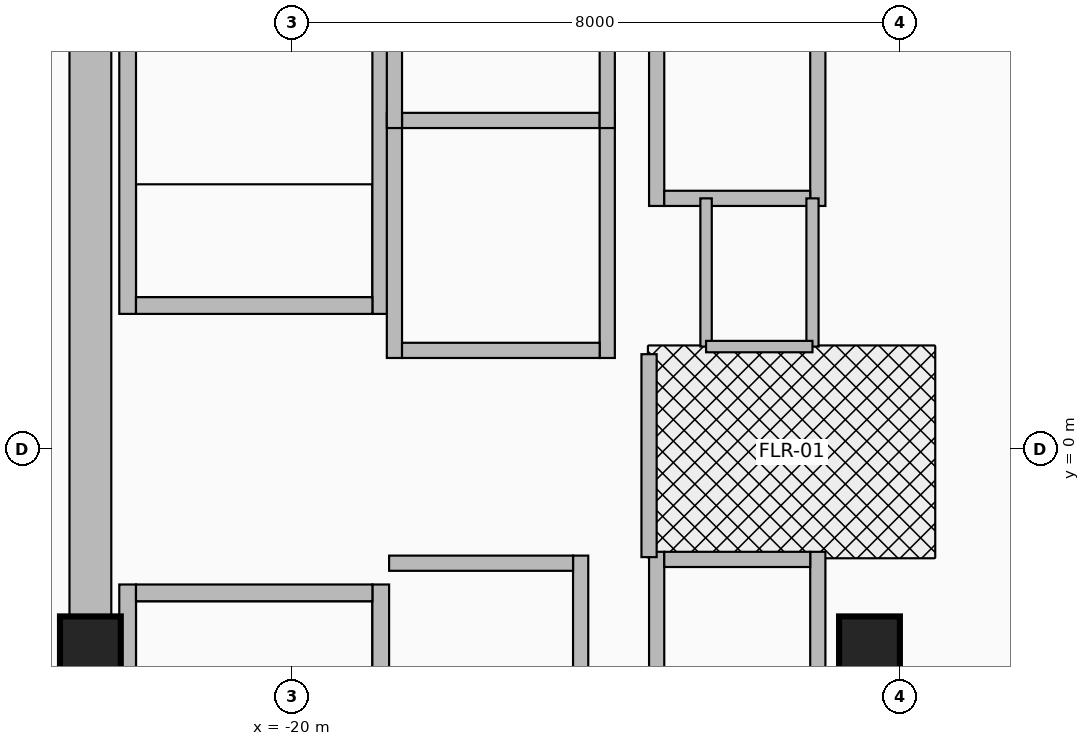
"""IFC4 building model, lengths in metres.
Left out: names, types, materials, properties, quantities, classifications, styles, units other than length and angle.
Written with IfcOpenShell. Run it as: python <this file> out.ifc"""

import sys

from ifc_helpers import new_model, si_unit, direction, frame, frame_2d, origin, origin_2d, place, context, subcontext, project, spatial, rectangle, extrude, source, transform, mapped, element, fill, save


model = new_model("IFC4")
c1 = context("Model", 3, precision=1e-05, world=origin(), true_north=direction((0.0, 1.0)))
c2 = subcontext(c1, "Body", "Model", "MODEL_VIEW")
j1 = project(units=[si_unit("LENGTHUNIT", "METRE"), si_unit("PLANEANGLEUNIT", "RADIAN")], contexts=[c1])
p1 = place(None, origin())
s1 = spatial("IfcSite", under=j1, at=p1, CompositionType="ELEMENT")
p2 = place(p1, origin())
s2 = spatial("IfcBuilding", under=s1, at=p2, CompositionType="ELEMENT")
p3 = place(p2, frame((0.0, 0.0, 240.5)))
s3 = spatial("IfcBuildingStorey", under=s2, at=p3, CompositionType="ELEMENT", Elevation=240.5)
for number, where, z_axis, x_axis in (
    (1, (-22.16, 1.78, 0.0), (0.0, 0.0, 1.0), (0.0, 1.0, 0.0)),
    (2, (-18.83, 1.78, 0.0), (0.0, 0.0, 1.0), (0.0, 1.0, 0.0)),
):
    element("IfcWall", number, at=place(p3, frame(where, z_axis=z_axis, x_axis=x_axis)), inside=s3, PredefinedType="SHEAR", context=c2, shape_type="SweptSolid", body=[
        extrude(rectangle(XDim=8.745, YDim=0.22, at=frame_2d((4.373, 0.0))), origin(), (0.0, 0.0, 1.0), 3.26),
    ])
p4 = place(p3, frame((-22.05, 1.89, 0.0), z_axis=(0.0, 0.0, 1.0), x_axis=(1.0, 0.0, 0.0)))
e3 = element("IfcWall", 3, at=p4, inside=s3, PredefinedType="SHEAR", context=c2, shape_type="SweptSolid", body=[
    extrude(rectangle(XDim=3.11, YDim=0.22, at=frame_2d((1.555, 0.0))), origin(), (0.0, 0.0, 1.0), 3.26),
])
p5 = place(p4, frame((1.0, 0.0, 0.0)))
e4 = element("IfcOpeningElement", 4, at=p5, cuts=e3, PredefinedType="OPENING", context=c2, shape_type="SweptSolid", body=[
    extrude(rectangle(XDim=1.1, YDim=2.15, at=frame_2d((0.55, 1.075))), frame((0.0, 0.125, 0.0), z_axis=(0.0, -1.0, 0.0), x_axis=(1.0, 0.0, 0.0)), (0.0, 0.0, 1.0), 0.25),
])
for number, where, z_axis, x_axis in (
    (5, (-22.16, -10.525, 0.0), (0.0, 0.0, 1.0), (0.0, 1.0, 0.0)),
    (6, (-18.83, -10.525, 0.0), (0.0, 0.0, 1.0), (0.0, 1.0, 0.0)),
):
    element("IfcWall", number, at=place(p3, frame(where, z_axis=z_axis, x_axis=x_axis)), inside=s3, PredefinedType="SHEAR", context=c2, shape_type="SweptSolid", body=[
        extrude(rectangle(XDim=8.745, YDim=0.22, at=frame_2d((4.373, 0.0))), origin(), (0.0, 0.0, 1.0), 3.26),
    ])
p6 = place(p3, frame((-22.05, -1.89, 0.0), z_axis=(0.0, 0.0, 1.0), x_axis=(1.0, 0.0, 0.0)))
e7 = element("IfcWall", 7, at=p6, inside=s3, PredefinedType="SHEAR", context=c2, shape_type="SweptSolid", body=[
    extrude(rectangle(XDim=3.11, YDim=0.22, at=frame_2d((1.555, 0.0))), origin(), (0.0, 0.0, 1.0), 3.26),
])
p7 = place(p6, frame((1.0, 0.0, 0.0)))
e8 = element("IfcOpeningElement", 8, at=p7, cuts=e7, PredefinedType="OPENING", context=c2, shape_type="SweptSolid", body=[
    extrude(rectangle(XDim=1.1, YDim=2.15, at=frame_2d((0.55, 1.075))), frame((0.0, 0.125, 0.0), z_axis=(0.0, -1.0, 0.0), x_axis=(1.0, 0.0, 0.0)), (0.0, 0.0, 1.0), 0.25),
])
p8 = place(p3, frame((-22.65, -11.075, 0.0), z_axis=(0.0, 0.0, 1.0), x_axis=(0.0, 1.0, 0.0)))
e9 = element("IfcWall", 9, at=p8, inside=s3, PredefinedType="SHEAR", context=c2, shape_type="SweptSolid", body=[
    extrude(rectangle(XDim=22.15, YDim=0.55, at=frame_2d((11.075, 0.0))), origin(), (0.0, 0.0, 1.0), 3.26),
])
m1 = source(origin(), c2, "Body", "SweptSolid", [
    extrude(rectangle(XDim=0.8, YDim=0.8, at=origin_2d()), origin(), (0.0, 0.0, 1.0), 3.5),
])
for number, where, z_axis, x_axis in (
    (10, (-22.65, -2.6, 0.0), (0.0, 0.0, 1.0), (1.0, 0.0, 0.0)),
    (11, (-12.4, -2.6, 0.0), (0.0, 0.0, 1.0), (1.0, 0.0, 0.0)),
):
    element("IfcColumn", number, at=place(p3, frame(where, z_axis=z_axis, x_axis=x_axis)), inside=s3, PredefinedType="COLUMN", context=c2, shape_type="MappedRepresentation", body=[
        mapped(m1, transform((0.0, 0.0, 0.0), x_axis=(1.0, 0.0, 0.0), y_axis=(0.0, 1.0, 0.0), z_axis=(0.0, 0.0, 1.0), scale=1.0)),
    ])
for number, where, z_axis, x_axis in (
    (12, (-18.65, 1.2, 0.0), (0.0, 0.0, 1.0), (0.0, 1.0, 0.0)),
    (13, (-15.85, 1.2, 0.0), (0.0, 0.0, 1.0), (0.0, 1.0, 0.0)),
):
    element("IfcWall", number, at=place(p3, frame(where, z_axis=z_axis, x_axis=x_axis)), inside=s3, PredefinedType="MOVABLE", context=c2, shape_type="SweptSolid", body=[
        extrude(rectangle(XDim=3.225, YDim=0.2, at=frame_2d((1.613, 0.0))), origin(), (0.0, 0.0, 1.0), 3.26),
    ])
p9 = place(p3, frame((-18.55, 1.3, 0.0), z_axis=(0.0, 0.0, 1.0), x_axis=(1.0, 0.0, 0.0)))
e14 = element("IfcWall", 14, at=p9, inside=s3, PredefinedType="MOVABLE", context=c2, shape_type="SweptSolid", body=[
    extrude(rectangle(XDim=2.6, YDim=0.2, at=frame_2d((1.3, 0.0))), origin(), (0.0, 0.0, 1.0), 3.26),
])
p10 = place(p9, frame((0.7, 0.0, 0.0)))
e15 = element("IfcOpeningElement", 15, at=p10, cuts=e14, PredefinedType="OPENING", context=c2, shape_type="SweptSolid", body=[
    extrude(rectangle(XDim=1.2, YDim=2.1, at=frame_2d((0.6, 1.05))), frame((0.0, 0.115, 0.0), z_axis=(0.0, -1.0, 0.0), x_axis=(1.0, 0.0, 0.0)), (0.0, 0.0, 1.0), 0.23),
])
p11 = place(p3, frame((-18.55, 4.325, 0.0), z_axis=(0.0, 0.0, 1.0), x_axis=(1.0, 0.0, 0.0)))
e16 = element("IfcWall", 16, at=p11, inside=s3, PredefinedType="MOVABLE", context=c2, shape_type="SweptSolid", body=[
    extrude(rectangle(XDim=2.6, YDim=0.2, at=frame_2d((1.3, 0.0))), origin(), (0.0, 0.0, 1.0), 3.26),
])
p12 = place(p3, frame((-16.2, -4.6, 0.0), z_axis=(0.0, 0.0, 1.0), x_axis=(0.0, 1.0, 0.0)))
e17 = element("IfcWall", 17, at=p12, inside=s3, PredefinedType="MOVABLE", context=c2, shape_type="SweptSolid", body=[
    extrude(rectangle(XDim=3.2, YDim=0.2, at=frame_2d((1.6, 0.0))), origin(), (0.0, 0.0, 1.0), 3.26),
])
p13 = place(p3, frame((-18.72, -1.5, 0.0), z_axis=(0.0, 0.0, 1.0), x_axis=(1.0, 0.0, 0.0)))
e18 = element("IfcWall", 18, at=p13, inside=s3, PredefinedType="MOVABLE", context=c2, shape_type="SweptSolid", body=[
    extrude(rectangle(XDim=2.42, YDim=0.2, at=frame_2d((1.21, 0.0))), origin(), (0.0, 0.0, 1.0), 3.26),
])
p14 = place(p13, frame((0.61, 0.0, 0.0)))
e19 = element("IfcOpeningElement", 19, at=p14, cuts=e18, PredefinedType="OPENING", context=c2, shape_type="SweptSolid", body=[
    extrude(rectangle(XDim=1.2, YDim=2.1, at=frame_2d((0.6, 1.05))), frame((0.0, 0.115, 0.0), z_axis=(0.0, -1.0, 0.0), x_axis=(1.0, 0.0, 0.0)), (0.0, 0.0, 1.0), 0.23),
])
for number, where, z_axis, x_axis in (
    (20, (-18.65, 4.225, 0.0), (0.0, 0.0, 1.0), (0.0, 1.0, 0.0)),
    (21, (-15.85, 4.225, 0.0), (0.0, 0.0, 1.0), (0.0, 1.0, 0.0)),
):
    element("IfcWall", number, at=place(p3, frame(where, z_axis=z_axis, x_axis=x_axis)), inside=s3, PredefinedType="MOVABLE", context=c2, shape_type="SweptSolid", body=[
        extrude(rectangle(XDim=3.325, YDim=0.2, at=frame_2d((1.663, 0.0))), origin(), (0.0, 0.0, 1.0), 3.26),
    ])
p15 = place(p3, frame((-15.2, 3.2, 0.0), z_axis=(0.0, 0.0, 1.0), x_axis=(0.0, 1.0, 0.0)))
e22 = element("IfcWall", 22, at=p15, inside=s3, PredefinedType="MOVABLE", context=c2, shape_type="SweptSolid", body=[
    extrude(rectangle(XDim=2.25, YDim=0.2, at=frame_2d((1.125, 0.0))), origin(), (0.0, 0.0, 1.0), 3.26),
])
p16 = place(p3, frame((-13.08, 3.2, 0.0), z_axis=(0.0, 0.0, 1.0), x_axis=(0.0, 1.0, 0.0)))
e23 = element("IfcWall", 23, at=p16, inside=s3, PredefinedType="MOVABLE", context=c2, shape_type="SweptSolid", body=[
    extrude(rectangle(XDim=2.25, YDim=0.2, at=frame_2d((1.125, 0.0))), origin(), (0.0, 0.0, 1.0), 3.26),
])
p17 = place(p16, frame((0.575, 0.0, 0.0)))
e24 = element("IfcOpeningElement", 24, at=p17, cuts=e23, PredefinedType="OPENING", context=c2, shape_type="SweptSolid", body=[
    extrude(rectangle(XDim=1.1, YDim=2.1, at=frame_2d((0.55, 1.05))), frame((0.0, 0.115, 0.0), z_axis=(0.0, -1.0, 0.0), x_axis=(1.0, 0.0, 0.0)), (0.0, 0.0, 1.0), 0.23),
])
p18 = place(p3, frame((-15.1, 3.3, 0.0), z_axis=(0.0, 0.0, 1.0), x_axis=(1.0, 0.0, 0.0)))
e25 = element("IfcWall", 25, at=p18, inside=s3, PredefinedType="MOVABLE", context=c2, shape_type="SweptSolid", body=[
    extrude(rectangle(XDim=1.92, YDim=0.2, at=frame_2d((0.96, 0.0))), origin(), (0.0, 0.0, 1.0), 3.26),
])
for number, where, z_axis, x_axis in (
    (26, (-15.2, -3.7, 0.0), (0.0, 0.0, 1.0), (0.0, 1.0, 0.0)),
    (27, (-13.08, -3.7, 0.0), (0.0, 0.0, 1.0), (0.0, 1.0, 0.0)),
):
    element("IfcWall", number, at=place(p3, frame(where, z_axis=z_axis, x_axis=x_axis)), inside=s3, PredefinedType="MOVABLE", context=c2, shape_type="SweptSolid", body=[
        extrude(rectangle(XDim=2.35, YDim=0.2, at=frame_2d((1.175, 0.0))), origin(), (0.0, 0.0, 1.0), 3.26),
    ])
p19 = place(p3, frame((-15.1, -1.45, 0.0), z_axis=(0.0, 0.0, 1.0), x_axis=(1.0, 0.0, 0.0)))
e28 = element("IfcWall", 28, at=p19, inside=s3, PredefinedType="MOVABLE", context=c2, shape_type="SweptSolid", body=[
    extrude(rectangle(XDim=1.92, YDim=0.2, at=frame_2d((0.96, 0.0))), origin(), (0.0, 0.0, 1.0), 3.26),
])
p20 = place(p19, frame((0.41, 0.0, 0.0)))
e29 = element("IfcOpeningElement", 29, at=p20, cuts=e28, PredefinedType="OPENING", context=c2, shape_type="SweptSolid", body=[
    extrude(rectangle(XDim=1.1, YDim=2.1, at=frame_2d((0.55, 1.05))), frame((0.0, 0.115, 0.0), z_axis=(0.0, -1.0, 0.0), x_axis=(1.0, 0.0, 0.0)), (0.0, 0.0, 1.0), 0.23),
])
p21 = place(p3, frame((-15.3, -1.42, 0.0), z_axis=(0.0, 0.0, 1.0), x_axis=(0.0, 1.0, 0.0)))
e30 = element("IfcWall", 30, at=p21, inside=s3, PredefinedType="PARTITIONING", context=c2, shape_type="SweptSolid", body=[
    extrude(rectangle(XDim=2.67, YDim=0.2, at=frame_2d((1.335, 0.0))), origin(), (0.0, 0.0, 1.0), 3.26),
])
p22 = place(p21, frame((0.78, 0.0, 0.0)))
e31 = element("IfcOpeningElement", 31, at=p22, cuts=e30, PredefinedType="OPENING", context=c2, shape_type="SweptSolid", body=[
    extrude(rectangle(XDim=1.05, YDim=2.15, at=frame_2d((0.525, 1.075))), frame((0.0, 0.115, 0.0), z_axis=(0.0, -1.0, 0.0), x_axis=(1.0, 0.0, 0.0)), (0.0, 0.0, 1.0), 0.23),
])
p23 = place(p3, frame((-13.15, 1.35, 0.0), z_axis=(0.0, 0.0, 1.0), x_axis=(0.0, 1.0, 0.0)))
e32 = element("IfcWall", 32, at=p23, inside=s3, PredefinedType="PARTITIONING", context=c2, shape_type="SweptSolid", body=[
    extrude(rectangle(XDim=1.95, YDim=0.16, at=frame_2d((0.975, 0.0))), origin(), (0.0, 0.0, 1.0), 3.26),
])
p24 = place(p3, frame((-14.55, 1.35, 0.0), z_axis=(0.0, 0.0, 1.0), x_axis=(0.0, 1.0, 0.0)))
e33 = element("IfcWall", 33, at=p24, inside=s3, PredefinedType="PARTITIONING", context=c2, shape_type="SweptSolid", body=[
    extrude(rectangle(XDim=1.95, YDim=0.15, at=frame_2d((0.975, 0.0))), origin(), (0.0, 0.0, 1.0), 3.26),
])
p25 = place(p3, frame((-14.55, 1.35, 0.0), z_axis=(0.0, 0.0, 1.0), x_axis=(1.0, 0.0, 0.0)))
e34 = element("IfcWall", 34, at=p25, inside=s3, PredefinedType="PARTITIONING", context=c2, shape_type="SweptSolid", body=[
    extrude(rectangle(XDim=1.4, YDim=0.15, at=frame_2d((0.7, 0.0))), origin(), (0.0, 0.0, 1.0), 3.26),
])
p26 = place(p25, frame((0.275, 0.0, 0.0)))
e35 = element("IfcOpeningElement", 35, at=p26, cuts=e34, PredefinedType="OPENING", context=c2, shape_type="SweptSolid", body=[
    extrude(rectangle(XDim=0.85, YDim=2.05, at=frame_2d((0.425, 1.025))), frame((0.0, 0.09, 0.0), z_axis=(0.0, -1.0, 0.0), x_axis=(1.0, 0.0, 0.0)), (0.0, 0.0, 1.0), 0.18),
])
p27 = place(p10, origin())
e36 = element("IfcDoor", 36, at=p27, inside=s3, OperationType="DOUBLE_DOOR_SLIDING", PredefinedType="DOOR", context=c2, shape_type="SweptSolid", body=[
    extrude(rectangle(XDim=1.2, YDim=2.1, at=frame_2d((0.6, 1.05))), frame((0.0, 0.025, 0.0), z_axis=(0.0, -1.0, 0.0), x_axis=(1.0, 0.0, 0.0)), (0.0, 0.0, 1.0), 0.05),
])
fill(e15, e36)
p28 = place(p14, origin())
e37 = element("IfcDoor", 37, at=p28, inside=s3, OperationType="DOUBLE_DOOR_SLIDING", PredefinedType="DOOR", context=c2, shape_type="SweptSolid", body=[
    extrude(rectangle(XDim=1.2, YDim=2.1, at=frame_2d((0.6, 1.05))), frame((0.0, 0.025, 0.0), z_axis=(0.0, -1.0, 0.0), x_axis=(1.0, 0.0, 0.0)), (0.0, 0.0, 1.0), 0.05),
])
fill(e19, e37)
p29 = place(p17, origin())
e38 = element("IfcDoor", 38, at=p29, inside=s3, OperationType="DOUBLE_DOOR_SLIDING", PredefinedType="DOOR", context=c2, shape_type="SweptSolid", body=[
    extrude(rectangle(XDim=1.1, YDim=2.1, at=frame_2d((0.55, 1.05))), frame((0.0, 0.025, 0.0), z_axis=(0.0, -1.0, 0.0), x_axis=(1.0, 0.0, 0.0)), (0.0, 0.0, 1.0), 0.05),
])
fill(e24, e38)
p30 = place(p20, origin())
e39 = element("IfcDoor", 39, at=p30, inside=s3, OperationType="DOUBLE_DOOR_SLIDING", PredefinedType="DOOR", context=c2, shape_type="SweptSolid", body=[
    extrude(rectangle(XDim=1.1, YDim=2.1, at=frame_2d((0.55, 1.05))), frame((0.0, 0.025, 0.0), z_axis=(0.0, -1.0, 0.0), x_axis=(1.0, 0.0, 0.0)), (0.0, 0.0, 1.0), 0.05),
])
fill(e29, e39)
p31 = place(p22, origin())
e40 = element("IfcDoor", 40, at=p31, inside=s3, OperationType="SINGLE_SWING_RIGHT", PredefinedType="DOOR", context=c2, shape_type="SweptSolid", body=[
    extrude(rectangle(XDim=1.05, YDim=2.15, at=frame_2d((0.525, 1.075))), frame((0.0, 0.025, 0.0), z_axis=(0.0, -1.0, 0.0), x_axis=(1.0, 0.0, 0.0)), (0.0, 0.0, 1.0), 0.05),
])
fill(e31, e40)
p32 = place(p5, frame((1.1, 0.0, 0.0), z_axis=(0.0, 0.0, 1.0), x_axis=(-1.0, 0.0, 0.0)))
e41 = element("IfcDoor", 41, at=p32, inside=s3, OperationType="SINGLE_SWING_LEFT", PredefinedType="DOOR", context=c2, shape_type="SweptSolid", body=[
    extrude(rectangle(XDim=1.1, YDim=2.15, at=frame_2d((0.55, 1.075))), frame((0.0, 0.025, 0.0), z_axis=(0.0, -1.0, 0.0), x_axis=(1.0, 0.0, 0.0)), (0.0, 0.0, 1.0), 0.05),
])
fill(e4, e41)
p33 = place(p7, origin())
e42 = element("IfcDoor", 42, at=p33, inside=s3, OperationType="SINGLE_SWING_RIGHT", PredefinedType="DOOR", context=c2, shape_type="SweptSolid", body=[
    extrude(rectangle(XDim=1.1, YDim=2.15, at=frame_2d((0.55, 1.075))), frame((0.0, 0.025, 0.0), z_axis=(0.0, -1.0, 0.0), x_axis=(1.0, 0.0, 0.0)), (0.0, 0.0, 1.0), 0.05),
])
fill(e8, e42)
p34 = place(p26, origin())
e43 = element("IfcDoor", 43, at=p34, inside=s3, OperationType="SINGLE_SWING_RIGHT", PredefinedType="DOOR", context=c2, shape_type="SweptSolid", body=[
    extrude(rectangle(XDim=0.85, YDim=2.05, at=frame_2d((0.425, 1.025))), frame((0.0, 0.025, 0.0), z_axis=(0.0, -1.0, 0.0), x_axis=(1.0, 0.0, 0.0)), (0.0, 0.0, 1.0), 0.05),
])
fill(e35, e43)
save(model, sys.argv[1])
